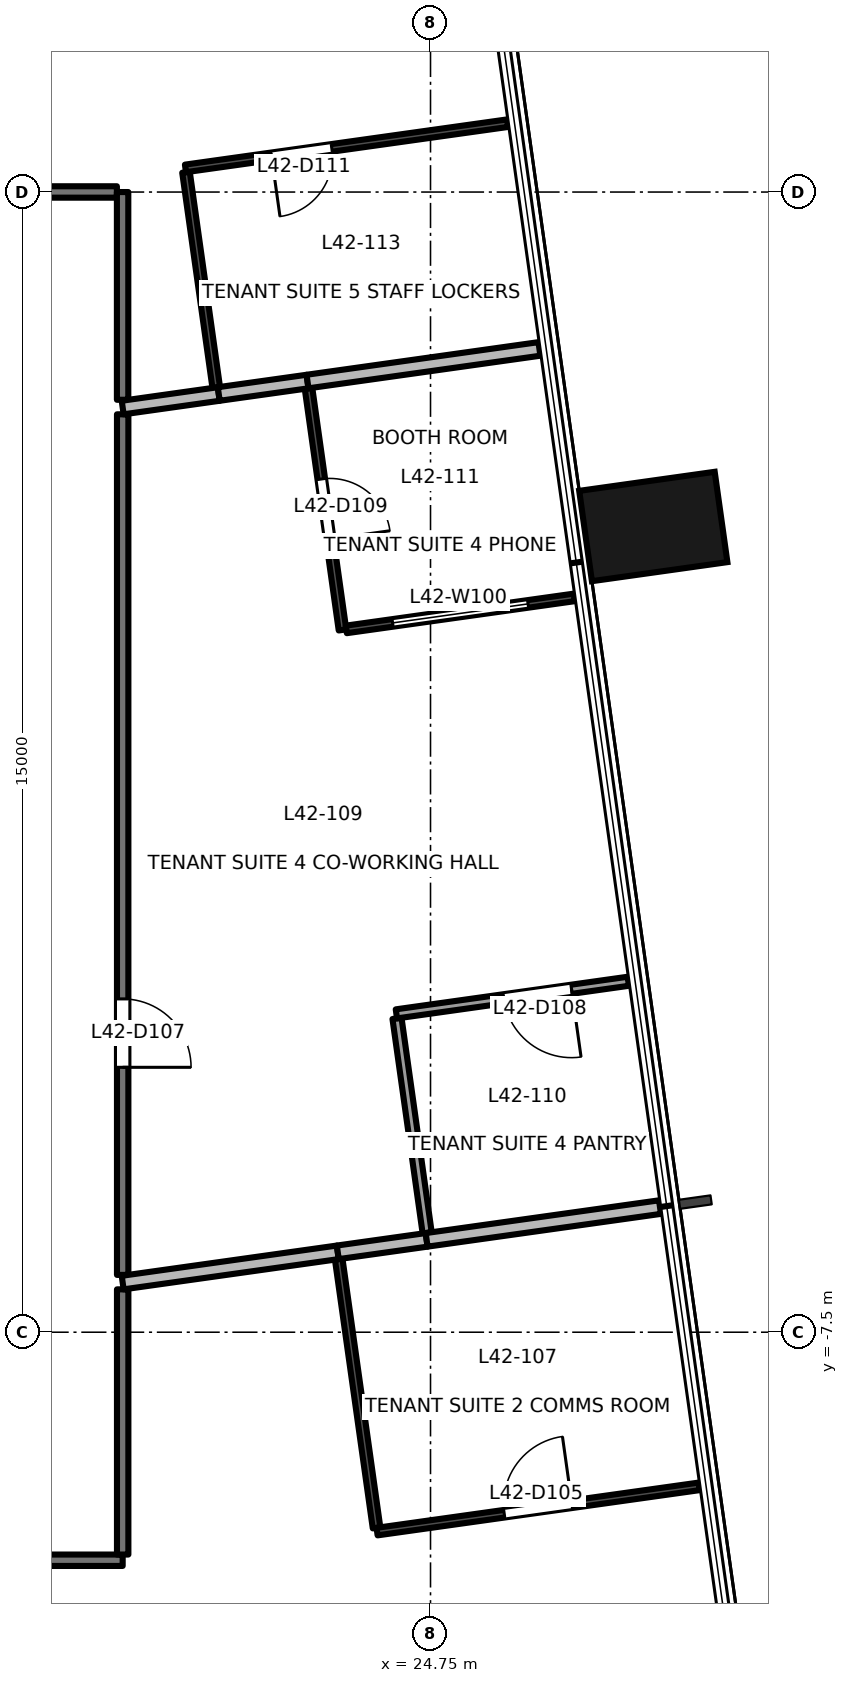
"""IFC4 building model, lengths in metres.
Left out: names, types, materials, properties, quantities, classifications, styles, units other than length and angle.
Written with IfcOpenShell. Run it as: python <this file> out.ifc"""

import sys

from ifc_helpers import new_model, si_unit, direction, frame, frame_2d, origin, origin_2d, place, context, subcontext, project, spatial, rectangle, extrude, element, fill, save


model = new_model("IFC4")
c1 = context("Model", 3, precision=1e-05, world=origin(), true_north=direction((0.0, 1.0)))
c2 = subcontext(c1, "Body", "Model", "MODEL_VIEW")
j1 = project(units=[si_unit("LENGTHUNIT", "METRE"), si_unit("PLANEANGLEUNIT", "RADIAN")], contexts=[c1])
p1 = place(None, origin())
s1 = spatial("IfcSite", under=j1, at=p1, CompositionType="ELEMENT")
p2 = place(p1, origin())
s2 = spatial("IfcBuilding", under=s1, at=p2, CompositionType="ELEMENT")
p3 = place(p2, frame((0.0, 0.0, 184.1)))
s3 = spatial("IfcBuildingStorey", under=s2, at=p3, CompositionType="ELEMENT", Elevation=184.1)
p4 = place(p3, frame((27.681, 3.1, -0.2), z_axis=(0.0, 0.0, 1.0), x_axis=(-0.139190384377, 0.990265639562, 0.0)))
e1 = element("IfcColumn", 1, at=p4, inside=s3, PredefinedType="COLUMN", context=c2, shape_type="SweptSolid", body=[
    extrude(rectangle(XDim=1.2, YDim=1.8, at=origin_2d()), origin(), (0.0, 0.0, 1.0), 3.9),
])
p5 = place(p3, frame((20.7, -10.5, 0.0), z_axis=(0.0, 0.0, 1.0), x_axis=(-1.0, 0.0, 0.0)))
e2 = element("IfcWall", 2, at=p5, inside=s3, PredefinedType="PARTITIONING", context=c2, shape_type="SweptSolid", body=[
    extrude(rectangle(XDim=7.251, YDim=0.15, at=frame_2d((3.625, 0.0))), origin(), (0.0, 0.0, 1.0), 3.1),
])
p6 = place(p3, frame((20.7, -6.936, 0.0), z_axis=(0.0, 0.0, 1.0), x_axis=(0.0, -1.0, 0.0)))
e3 = element("IfcWall", 3, at=p6, inside=s3, PredefinedType="PARTITIONING", context=c2, shape_type="SweptSolid", body=[
    extrude(rectangle(XDim=3.489, YDim=0.15, at=frame_2d((1.745, 0.0))), origin(), (0.0, 0.0, 1.0), 3.7),
])
p7 = place(p3, frame((20.7, 4.576, 0.0), z_axis=(0.0, 0.0, 1.0), x_axis=(0.0, -1.0, 0.0)))
e4 = element("IfcWall", 4, at=p7, inside=s3, PredefinedType="PARTITIONING", context=c2, shape_type="SweptSolid", body=[
    extrude(rectangle(XDim=11.322, YDim=0.15, at=frame_2d((5.661, 0.0))), origin(), (0.0, 0.0, 1.0), 3.25),
])
p8 = place(p7, frame((7.691, 0.0, 0.0)))
e5 = element("IfcOpeningElement", 5, at=p8, cuts=e4, PredefinedType="OPENING", context=c2, shape_type="SweptSolid", body=[
    extrude(rectangle(XDim=0.9, YDim=2.1, at=frame_2d((0.45, 1.05))), frame((0.0, 0.085, 0.0), z_axis=(0.0, -1.0, 0.0), x_axis=(1.0, 0.0, 0.0)), (0.0, 0.0, 1.0), 0.171),
])
p9 = place(p3, frame((18.0, 7.501, 0.0), z_axis=(0.0, 0.0, 1.0), x_axis=(1.0, 0.0, 0.0)))
e6 = element("IfcWall", 6, at=p9, inside=s3, PredefinedType="PARTITIONING", context=c2, shape_type="SweptSolid", body=[
    extrude(rectangle(XDim=2.624, YDim=0.15, at=frame_2d((1.312, 0.0))), origin(), (0.0, 0.0, 1.0), 3.7),
])
p10 = place(p3, frame((20.699, 7.5, 0.0), z_axis=(0.0, 0.0, 1.0), x_axis=(0.0, -1.0, 0.0)))
e7 = element("IfcWall", 7, at=p10, inside=s3, PredefinedType="PARTITIONING", context=c2, shape_type="SweptSolid", body=[
    extrude(rectangle(XDim=2.733, YDim=0.15, at=frame_2d((1.366, 0.0))), origin(), (0.0, 0.0, 1.0), 3.7),
])
p11 = place(p3, frame((23.542, -6.538, 0.0), z_axis=(0.0, 0.0, 1.0), x_axis=(0.139477964322, -0.990225175134, 0.0)))
e8 = element("IfcWall", 8, at=p11, inside=s3, PredefinedType="PARTITIONING", context=c2, shape_type="SweptSolid", body=[
    extrude(rectangle(XDim=3.571, YDim=0.1, at=frame_2d((1.785, 0.0))), origin(), (0.0, 0.0, 1.0), 3.7),
])
p12 = place(p3, frame((24.047, -10.123, 0.0), z_axis=(0.0, 0.0, 1.0), x_axis=(0.990283364174, 0.139064224876, 0.0)))
e9 = element("IfcWall", 9, at=p12, inside=s3, PredefinedType="PARTITIONING", context=c2, shape_type="SweptSolid", body=[
    extrude(rectangle(XDim=4.278, YDim=0.1, at=frame_2d((2.139, 0.0))), origin(), (0.0, 0.0, 1.0), 3.7),
])
p13 = place(p12, frame((1.689, 0.0, 0.0)))
e10 = element("IfcOpeningElement", 10, at=p13, cuts=e9, PredefinedType="OPENING", context=c2, shape_type="SweptSolid", body=[
    extrude(rectangle(XDim=0.9, YDim=2.1, at=frame_2d((0.45, 1.05))), frame((0.0, 0.061, 0.0), z_axis=(0.0, -1.0, 0.0), x_axis=(1.0, 0.0, 0.0)), (0.0, 0.0, 1.0), 0.121),
])
p14 = place(p3, frame((20.7, -6.847, 0.0), z_axis=(0.0, 0.0, 1.0), x_axis=(0.990258051292, 0.139244360214, 0.0)))
e11 = element("IfcWall", 11, at=p14, inside=s3, PredefinedType="PARTITIONING", context=c2, shape_type="SweptSolid", body=[
    extrude(rectangle(XDim=2.858, YDim=0.18, at=frame_2d((1.429, 0.0))), origin(), (0.0, 0.0, 1.0), 3.7),
])
p15 = place(p3, frame((23.53, -6.449, 0.0), z_axis=(0.0, 0.0, 1.0), x_axis=(0.990293977152, 0.138988628372, 0.0)))
e12 = element("IfcWall", 12, at=p15, inside=s3, PredefinedType="PARTITIONING", context=c2, shape_type="SweptSolid", body=[
    extrude(rectangle(XDim=1.18, YDim=0.18, at=frame_2d((0.59, 0.0))), origin(), (0.0, 0.0, 1.0), 3.7),
])
p16 = place(p3, frame((24.699, -6.285, 0.0), z_axis=(0.0, 0.0, 1.0), x_axis=(0.990293026317, 0.138995402899, 0.0)))
e13 = element("IfcWall", 13, at=p16, inside=s3, PredefinedType="PARTITIONING", context=c2, shape_type="SweptSolid", body=[
    extrude(rectangle(XDim=3.1, YDim=0.18, at=frame_2d((1.55, 0.0))), origin(), (0.0, 0.0, 1.0), 3.7),
])
p17 = place(p3, frame((24.309, -3.371, 0.0), z_axis=(0.0, 0.0, 1.0), x_axis=(0.139298147854, -0.990250486495, 0.0)))
e14 = element("IfcWall", 14, at=p17, inside=s3, PredefinedType="PARTITIONING", context=c2, shape_type="SweptSolid", body=[
    extrude(rectangle(XDim=2.85, YDim=0.12, at=frame_2d((1.425, 0.0))), origin(), (0.0, 0.0, 1.0), 3.25),
])
p18 = place(p3, frame((27.352, -2.883, 0.0), z_axis=(0.0, 0.0, 1.0), x_axis=(-0.990260846741, -0.139224478493, 0.0)))
e15 = element("IfcWall", 15, at=p18, inside=s3, PredefinedType="PARTITIONING", context=c2, shape_type="SweptSolid", body=[
    extrude(rectangle(XDim=3.081, YDim=0.12, at=frame_2d((1.541, 0.0))), origin(), (0.0, 0.0, 1.0), 3.7),
])
p19 = place(p18, frame((0.754, 0.0, 0.0)))
e16 = element("IfcOpeningElement", 16, at=p19, cuts=e15, PredefinedType="OPENING", context=c2, shape_type="SweptSolid", body=[
    extrude(rectangle(XDim=0.9, YDim=2.1, at=frame_2d((0.45, 1.05))), frame((0.0, 0.071, 0.0), z_axis=(0.0, -1.0, 0.0), x_axis=(1.0, 0.0, 0.0)), (0.0, 0.0, 1.0), 0.141),
])
p20 = place(p3, frame((23.145, 4.918, 0.0), z_axis=(0.0, 0.0, 1.0), x_axis=(0.139249005145, -0.990257398138, 0.0)))
e17 = element("IfcWall", 17, at=p20, inside=s3, PredefinedType="PARTITIONING", context=c2, shape_type="SweptSolid", body=[
    extrude(rectangle(XDim=3.21, YDim=0.1, at=frame_2d((1.605, 0.0))), origin(), (0.0, 0.0, 1.0), 3.25),
])
p21 = place(p20, frame((1.205, 0.0, 0.0)))
e18 = element("IfcOpeningElement", 18, at=p21, cuts=e17, PredefinedType="OPENING", context=c2, shape_type="SweptSolid", body=[
    extrude(rectangle(XDim=0.8, YDim=2.1, at=frame_2d((0.4, 1.05))), frame((0.0, 0.061, 0.0), z_axis=(0.0, -1.0, 0.0), x_axis=(1.0, 0.0, 0.0)), (0.0, 0.0, 1.0), 0.121),
])
p22 = place(p3, frame((23.642, 1.746, 0.0), z_axis=(0.0, 0.0, 1.0), x_axis=(0.990294755806, 0.138983080349, 0.0)))
e19 = element("IfcWall", 19, at=p22, inside=s3, PredefinedType="PARTITIONING", context=c2, shape_type="SweptSolid", body=[
    extrude(rectangle(XDim=3.028, YDim=0.1, at=frame_2d((1.514, 0.0))), origin(), (0.0, 0.0, 1.0), 3.7),
])
p23 = place(p22, frame((0.615, 0.0, 0.9)))
e20 = element("IfcOpeningElement", 20, at=p23, cuts=e19, PredefinedType="OPENING", context=c2, shape_type="SweptSolid", body=[
    extrude(rectangle(XDim=1.8, YDim=1.2, at=frame_2d((0.9, 0.6))), frame((0.0, 0.061, 0.0), z_axis=(0.0, -1.0, 0.0), x_axis=(1.0, 0.0, 0.0)), (0.0, 0.0, 1.0), 0.121),
])
p24 = place(p3, frame((20.7, 4.665, 0.0), z_axis=(0.0, 0.0, 1.0), x_axis=(0.99023431529, 0.139413058294, 0.0)))
e21 = element("IfcWall", 21, at=p24, inside=s3, PredefinedType="PARTITIONING", context=c2, shape_type="SweptSolid", body=[
    extrude(rectangle(XDim=1.277, YDim=0.18, at=frame_2d((0.638, 0.0))), origin(), (0.0, 0.0, 1.0), 3.25),
])
p25 = place(p3, frame((21.964, 4.843, 0.0), z_axis=(0.0, 0.0, 1.0), x_axis=(0.990277975586, 0.139102591888, 0.0)))
e22 = element("IfcWall", 22, at=p25, inside=s3, PredefinedType="PARTITIONING", context=c2, shape_type="SweptSolid", body=[
    extrude(rectangle(XDim=1.179, YDim=0.18, at=frame_2d((0.59, 0.0))), origin(), (0.0, 0.0, 1.0), 3.7),
])
p26 = place(p3, frame((23.132, 5.007, 0.0), z_axis=(0.0, 0.0, 1.0), x_axis=(0.990260846741, 0.139224478493, 0.0)))
e23 = element("IfcWall", 23, at=p26, inside=s3, PredefinedType="PARTITIONING", context=c2, shape_type="SweptSolid", body=[
    extrude(rectangle(XDim=3.081, YDim=0.18, at=frame_2d((1.541, 0.0))), origin(), (0.0, 0.0, 1.0), 3.7),
])
p27 = place(p3, frame((21.533, 7.761, 0.0), z_axis=(0.0, 0.0, 1.0), x_axis=(0.139150189669, -0.990271288443, 0.0)))
e24 = element("IfcWall", 24, at=p27, inside=s3, PredefinedType="PARTITIONING", context=c2, shape_type="SweptSolid", body=[
    extrude(rectangle(XDim=2.86, YDim=0.1, at=frame_2d((1.43, 0.0))), origin(), (0.0, 0.0, 1.0), 3.7),
])
p28 = place(p3, frame((25.764, 8.406, 0.0), z_axis=(0.0, 0.0, 1.0), x_axis=(-0.99028887957, -0.139024943805, 0.0)))
e25 = element("IfcWall", 25, at=p28, inside=s3, PredefinedType="PARTITIONING", context=c2, shape_type="SweptSolid", body=[
    extrude(rectangle(XDim=4.28, YDim=0.1, at=frame_2d((2.14, 0.0))), origin(), (0.0, 0.0, 1.0), 3.7),
])
p29 = place(p28, frame((2.336, 0.0, 0.0)))
e26 = element("IfcOpeningElement", 26, at=p29, cuts=e25, PredefinedType="OPENING", context=c2, shape_type="SweptSolid", body=[
    extrude(rectangle(XDim=0.8, YDim=2.1, at=frame_2d((0.4, 1.05))), frame((0.0, 0.061, 0.0), z_axis=(0.0, -1.0, 0.0), x_axis=(1.0, 0.0, 0.0)), (0.0, 0.0, 1.0), 0.121),
])
p30 = place(p13, origin())
e27 = element("IfcDoor", 27, at=p30, inside=s3, OperationType="SINGLE_SWING_RIGHT", PredefinedType="DOOR", context=c2, shape_type="SweptSolid", body=[
    extrude(rectangle(XDim=0.9, YDim=2.1, at=frame_2d((0.45, 1.05))), frame((0.0, 0.025, 0.0), z_axis=(0.0, -1.0, 0.0), x_axis=(1.0, 0.0, 0.0)), (0.0, 0.0, 1.0), 0.05),
])
fill(e10, e27)
p31 = place(p8, origin())
e28 = element("IfcDoor", 28, at=p31, inside=s3, OperationType="SINGLE_SWING_RIGHT", PredefinedType="DOOR", context=c2, shape_type="SweptSolid", body=[
    extrude(rectangle(XDim=0.9, YDim=2.1, at=frame_2d((0.45, 1.05))), frame((0.0, 0.025, 0.0), z_axis=(0.0, -1.0, 0.0), x_axis=(1.0, 0.0, 0.0)), (0.0, 0.0, 1.0), 0.05),
])
fill(e5, e28)
p32 = place(p19, origin())
e29 = element("IfcDoor", 29, at=p32, inside=s3, OperationType="SINGLE_SWING_LEFT", PredefinedType="DOOR", context=c2, shape_type="SweptSolid", body=[
    extrude(rectangle(XDim=0.9, YDim=2.1, at=frame_2d((0.45, 1.05))), frame((0.0, 0.025, 0.0), z_axis=(0.0, -1.0, 0.0), x_axis=(1.0, 0.0, 0.0)), (0.0, 0.0, 1.0), 0.05),
])
fill(e16, e29)
p33 = place(p21, origin())
e30 = element("IfcDoor", 30, at=p33, inside=s3, OperationType="SINGLE_SWING_RIGHT", PredefinedType="DOOR", context=c2, shape_type="SweptSolid", body=[
    extrude(rectangle(XDim=0.8, YDim=2.1, at=frame_2d((0.4, 1.05))), frame((0.0, 0.025, 0.0), z_axis=(0.0, -1.0, 0.0), x_axis=(1.0, 0.0, 0.0)), (0.0, 0.0, 1.0), 0.05),
])
fill(e18, e30)
p34 = place(p29, origin())
e31 = element("IfcDoor", 31, at=p34, inside=s3, OperationType="SINGLE_SWING_RIGHT", PredefinedType="DOOR", context=c2, shape_type="SweptSolid", body=[
    extrude(rectangle(XDim=0.8, YDim=2.1, at=frame_2d((0.4, 1.05))), frame((0.0, 0.025, 0.0), z_axis=(0.0, -1.0, 0.0), x_axis=(1.0, 0.0, 0.0)), (0.0, 0.0, 1.0), 0.05),
])
fill(e26, e31)
p35 = place(p23, origin())
e32 = element("IfcWindow", 32, at=p35, inside=s3, PartitioningType="SINGLE_PANEL", PredefinedType="WINDOW", context=c2, shape_type="SweptSolid", body=[
    extrude(rectangle(XDim=1.8, YDim=1.2, at=frame_2d((0.9, 0.6))), frame((0.0, 0.03, 0.0), z_axis=(0.0, -1.0, 0.0), x_axis=(1.0, 0.0, 0.0)), (0.0, 0.0, 1.0), 0.06),
])
fill(e20, e32)
save(model, sys.argv[1])
